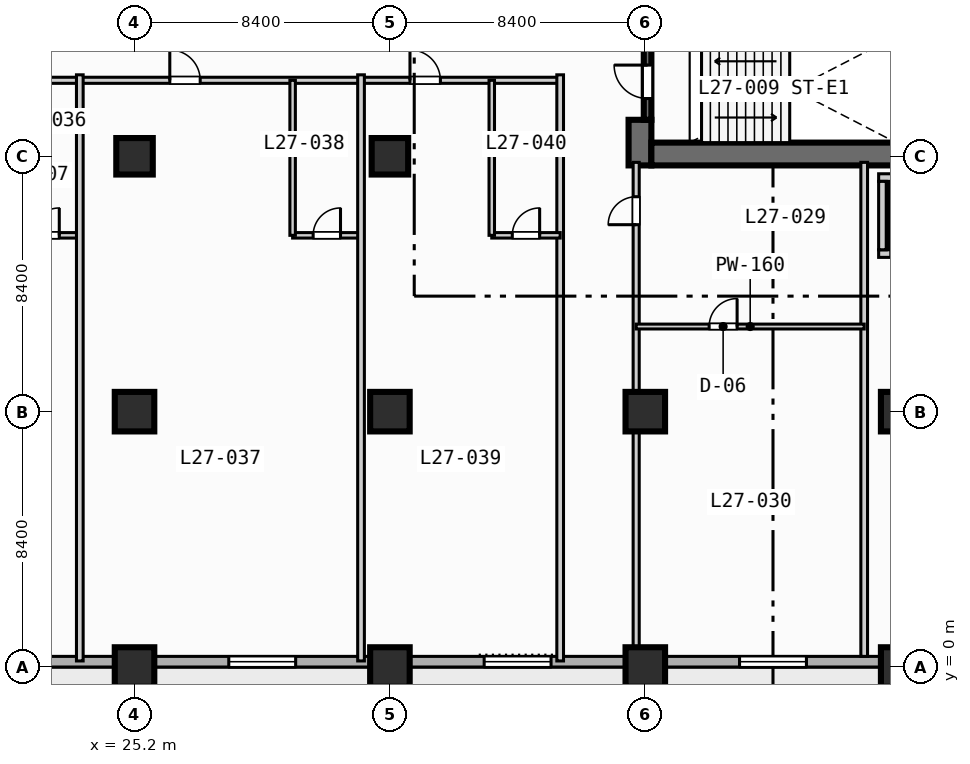
"""IFC4 building model, lengths in metres.
Left out: names, types, materials, properties, quantities, classifications, styles, units other than length and angle.
Written with IfcOpenShell. Run it as: python <this file> out.ifc"""

import sys

from ifc_helpers import new_model, si_unit, direction, frame, frame_2d, origin, origin_2d, place, context, subcontext, project, spatial, rectangle, extrude, element, fill, save


model = new_model("IFC4")
c1 = context("Model", 3, precision=1e-05, world=origin(), true_north=direction((0.0, 1.0)))
c2 = subcontext(c1, "Body", "Model", "MODEL_VIEW")
j1 = project(units=[si_unit("LENGTHUNIT", "METRE"), si_unit("PLANEANGLEUNIT", "RADIAN")], contexts=[c1])
p1 = place(None, origin())
s1 = spatial("IfcSite", under=j1, at=p1, CompositionType="ELEMENT")
p2 = place(p1, origin())
s2 = spatial("IfcBuilding", under=s1, at=p2, CompositionType="ELEMENT")
p3 = place(p2, frame((0.0, 0.0, 115.2)))
s3 = spatial("IfcBuildingStorey", under=s2, at=p3, CompositionType="ELEMENT", Elevation=115.2)
p4 = place(p3, frame((41.825, 16.5, 0.0), z_axis=(0.0, 0.0, 1.0), x_axis=(0.0, 1.0, 0.0)))
e1 = element("IfcWall", 1, at=p4, inside=s3, PredefinedType="SHEAR", context=c2, shape_type="SweptSolid", body=[
    extrude(rectangle(XDim=1.5, YDim=0.75, at=frame_2d((0.75, 0.0))), origin(), (0.0, 0.0, 1.0), 3.55),
])
p5 = place(p3, frame((42.2, 16.875, 0.0), z_axis=(0.0, 0.0, 1.0), x_axis=(1.0, 0.0, 0.0)))
e2 = element("IfcWall", 2, at=p5, inside=s3, PredefinedType="SHEAR", context=c2, shape_type="SweptSolid", body=[
    extrude(rectangle(XDim=16.35, YDim=0.75, at=frame_2d((8.175, 0.0))), origin(), (0.0, 0.0, 1.0), 3.55),
])
for number, where, z_axis, x_axis in (
    (3, (25.2, 0.0, 0.0), (0.0, 0.0, 1.0), (1.0, 0.0, 0.0)),
    (4, (25.2, 8.4, 0.0), (0.0, 0.0, 1.0), (1.0, 0.0, 0.0)),
):
    element("IfcColumn", number, at=place(p3, frame(where, z_axis=z_axis, x_axis=x_axis)), inside=s3, PredefinedType="COLUMN", context=c2, shape_type="SweptSolid", body=[
        extrude(rectangle(XDim=1.3, YDim=1.3, at=origin_2d()), origin(), (0.0, 0.0, 1.0), 3.8),
    ])
p6 = place(p3, frame((25.2, 16.8, 0.0), z_axis=(0.0, 0.0, 1.0), x_axis=(1.0, 0.0, 0.0)))
e5 = element("IfcColumn", 5, at=p6, inside=s3, PredefinedType="COLUMN", context=c2, shape_type="SweptSolid", body=[
    extrude(rectangle(XDim=1.2, YDim=1.2, at=origin_2d()), origin(), (0.0, 0.0, 1.0), 3.8),
])
for number, where, z_axis, x_axis in (
    (6, (33.6, 0.0, 0.0), (0.0, 0.0, 1.0), (1.0, 0.0, 0.0)),
    (7, (33.6, 8.4, 0.0), (0.0, 0.0, 1.0), (1.0, 0.0, 0.0)),
):
    element("IfcColumn", number, at=place(p3, frame(where, z_axis=z_axis, x_axis=x_axis)), inside=s3, PredefinedType="COLUMN", context=c2, shape_type="SweptSolid", body=[
        extrude(rectangle(XDim=1.3, YDim=1.3, at=origin_2d()), origin(), (0.0, 0.0, 1.0), 3.8),
    ])
p7 = place(p3, frame((33.6, 16.8, 0.0), z_axis=(0.0, 0.0, 1.0), x_axis=(1.0, 0.0, 0.0)))
e8 = element("IfcColumn", 8, at=p7, inside=s3, PredefinedType="COLUMN", context=c2, shape_type="SweptSolid", body=[
    extrude(rectangle(XDim=1.2, YDim=1.2, at=origin_2d()), origin(), (0.0, 0.0, 1.0), 3.8),
])
for number, where, z_axis, x_axis in (
    (9, (42.0, 0.0, 0.0), (0.0, 0.0, 1.0), (1.0, 0.0, 0.0)),
    (10, (42.0, 8.4, 0.0), (0.0, 0.0, 1.0), (1.0, 0.0, 0.0)),
    (11, (50.4, 0.0, 0.0), (0.0, 0.0, 1.0), (1.0, 0.0, 0.0)),
    (12, (50.4, 8.4, 0.0), (0.0, 0.0, 1.0), (1.0, 0.0, 0.0)),
):
    element("IfcColumn", number, at=place(p3, frame(where, z_axis=z_axis, x_axis=x_axis)), inside=s3, PredefinedType="COLUMN", context=c2, shape_type="SweptSolid", body=[
        extrude(rectangle(XDim=1.3, YDim=1.3, at=origin_2d()), origin(), (0.0, 0.0, 1.0), 3.8),
    ])
p8 = place(p3, frame((72.425, 0.175, 0.0), z_axis=(0.0, 0.0, 1.0), x_axis=(-1.0, 0.0, 0.0)))
e13 = element("IfcWall", 13, at=p8, inside=s3, PredefinedType="STANDARD", context=c2, shape_type="SweptSolid", body=[
    extrude(rectangle(XDim=69.25, YDim=0.35, at=frame_2d((34.625, 0.0))), origin(), (0.0, 0.0, 1.0), 3.55),
])
p9 = place(p8, frame((50.725, 0.0, 0.0)))
e14 = element("IfcOpeningElement", 14, at=p9, cuts=e13, PredefinedType="OPENING", context=c2, shape_type="SweptSolid", body=[
    extrude(rectangle(XDim=1.4, YDim=2.2, at=frame_2d((0.7, 1.1))), frame((0.0, 0.185, 0.0), z_axis=(0.0, -1.0, 0.0), x_axis=(1.0, 0.0, 0.0)), (0.0, 0.0, 1.0), 0.37),
])
p10 = place(p8, frame((58.725, 0.0, 0.85)))
e15 = element("IfcOpeningElement", 15, at=p10, cuts=e13, PredefinedType="OPENING", context=c2, shape_type="SweptSolid", body=[
    extrude(rectangle(XDim=2.2, YDim=1.8, at=frame_2d((1.1, 0.9))), frame((0.0, 0.185, 0.0), z_axis=(0.0, -1.0, 0.0), x_axis=(1.0, 0.0, 0.0)), (0.0, 0.0, 1.0), 0.37),
])
p11 = place(p8, frame((41.925, 0.0, 0.85)))
e16 = element("IfcOpeningElement", 16, at=p11, cuts=e13, PredefinedType="OPENING", context=c2, shape_type="SweptSolid", body=[
    extrude(rectangle(XDim=2.2, YDim=1.8, at=frame_2d((1.1, 0.9))), frame((0.0, 0.185, 0.0), z_axis=(0.0, -1.0, 0.0), x_axis=(1.0, 0.0, 0.0)), (0.0, 0.0, 1.0), 0.37),
])
p12 = place(p8, frame((33.525, 0.0, 0.85)))
e17 = element("IfcOpeningElement", 17, at=p12, cuts=e13, PredefinedType="OPENING", context=c2, shape_type="SweptSolid", body=[
    extrude(rectangle(XDim=2.2, YDim=1.8, at=frame_2d((1.1, 0.9))), frame((0.0, 0.185, 0.0), z_axis=(0.0, -1.0, 0.0), x_axis=(1.0, 0.0, 0.0)), (0.0, 0.0, 1.0), 0.37),
])
p13 = place(p8, frame((25.125, 0.0, 0.85)))
e18 = element("IfcOpeningElement", 18, at=p13, cuts=e13, PredefinedType="OPENING", context=c2, shape_type="SweptSolid", body=[
    extrude(rectangle(XDim=2.2, YDim=1.8, at=frame_2d((1.1, 0.9))), frame((0.0, 0.185, 0.0), z_axis=(0.0, -1.0, 0.0), x_axis=(1.0, 0.0, 0.0)), (0.0, 0.0, 1.0), 0.37),
])
p14 = place(p8, frame((8.325, 0.0, 0.85)))
e19 = element("IfcOpeningElement", 19, at=p14, cuts=e13, PredefinedType="OPENING", context=c2, shape_type="SweptSolid", body=[
    extrude(rectangle(XDim=2.2, YDim=1.8, at=frame_2d((1.1, 0.9))), frame((0.0, 0.185, 0.0), z_axis=(0.0, -1.0, 0.0), x_axis=(1.0, 0.0, 0.0)), (0.0, 0.0, 1.0), 0.37),
])
p15 = place(p8, frame((2.125, 0.0, 0.85)))
e20 = element("IfcOpeningElement", 20, at=p15, cuts=e13, PredefinedType="OPENING", context=c2, shape_type="SweptSolid", body=[
    extrude(rectangle(XDim=1.8, YDim=1.8, at=frame_2d((0.9, 0.9))), frame((0.0, 0.185, 0.0), z_axis=(0.0, -1.0, 0.0), x_axis=(1.0, 0.0, 0.0)), (0.0, 0.0, 1.0), 0.37),
])
p16 = place(p3, frame((42.075, 18.0, 0.0), z_axis=(0.0, 0.0, 1.0), x_axis=(0.0, 1.0, 0.0)))
e21 = element("IfcWall", 21, at=p16, inside=s3, PredefinedType="SOLIDWALL", context=c2, shape_type="SweptSolid", body=[
    extrude(rectangle(XDim=2.5, YDim=0.25, at=frame_2d((1.25, 0.0))), origin(), (0.0, 0.0, 1.0), 3.55),
])
p17 = place(p16, frame((0.7, 0.0, 0.0)))
e22 = element("IfcOpeningElement", 22, at=p17, cuts=e21, PredefinedType="OPENING", context=c2, shape_type="SweptSolid", body=[
    extrude(rectangle(XDim=1.1, YDim=2.15, at=frame_2d((0.55, 1.075))), frame((0.0, 0.135, 0.0), z_axis=(0.0, -1.0, 0.0), x_axis=(1.0, 0.0, 0.0)), (0.0, 0.0, 1.0), 0.27),
])
p18 = place(p3, frame((49.675, 13.6, 0.0), z_axis=(0.0, 0.0, 1.0), x_axis=(1.0, 0.0, 0.0)))
e23 = element("IfcWall", 23, at=p18, inside=s3, PredefinedType="SOLIDWALL", context=c2, shape_type="SweptSolid", body=[
    extrude(rectangle(XDim=2.25, YDim=0.25, at=frame_2d((1.125, 0.0))), origin(), (0.0, 0.0, 1.0), 3.55),
])
p19 = place(p18, frame((0.4, 0.0, 0.0)))
e24 = element("IfcOpeningElement", 24, at=p19, cuts=e23, PredefinedType="OPENING", context=c2, shape_type="SweptSolid", body=[
    extrude(rectangle(XDim=1.1, YDim=2.15, at=frame_2d((0.55, 1.075))), frame((0.0, 0.135, 0.0), z_axis=(0.0, -1.0, 0.0), x_axis=(1.0, 0.0, 0.0)), (0.0, 0.0, 1.0), 0.27),
])
for number, where, z_axis, x_axis in (
    (25, (49.675, 16.1, 0.0), (0.0, 0.0, 1.0), (1.0, 0.0, 0.0)),
    (26, (49.8, 13.725, 0.0), (0.0, 0.0, 1.0), (0.0, 1.0, 0.0)),
):
    element("IfcWall", number, at=place(p3, frame(where, z_axis=z_axis, x_axis=x_axis)), inside=s3, PredefinedType="SOLIDWALL", context=c2, shape_type="SweptSolid", body=[
        extrude(rectangle(XDim=2.25, YDim=0.25, at=frame_2d((1.125, 0.0))), origin(), (0.0, 0.0, 1.0), 3.55),
    ])
p20 = place(p3, frame((41.7, 0.35, 0.0), z_axis=(0.0, 0.0, 1.0), x_axis=(0.0, 1.0, 0.0)))
e27 = element("IfcWall", 27, at=p20, inside=s3, PredefinedType="PARTITIONING", context=c2, shape_type="SweptSolid", body=[
    extrude(rectangle(XDim=16.25, YDim=0.2, at=frame_2d((8.125, 0.0))), origin(), (0.0, 0.0, 1.0), 2.8),
])
p21 = place(p20, frame((14.2, 0.0, 0.0)))
e28 = element("IfcOpeningElement", 28, at=p21, cuts=e27, PredefinedType="OPENING", context=c2, shape_type="SweptSolid", body=[
    extrude(rectangle(XDim=0.92, YDim=2.1, at=frame_2d((0.46, 1.05))), frame((0.0, 0.11, 0.0), z_axis=(0.0, -1.0, 0.0), x_axis=(1.0, 0.0, 0.0)), (0.0, 0.0, 1.0), 0.22),
])
p22 = place(p3, frame((49.2, 0.35, 0.0), z_axis=(0.0, 0.0, 1.0), x_axis=(0.0, 1.0, 0.0)))
e29 = element("IfcWall", 29, at=p22, inside=s3, PredefinedType="PARTITIONING", context=c2, shape_type="SweptSolid", body=[
    extrude(rectangle(XDim=16.25, YDim=0.22, at=frame_2d((8.125, 0.0))), origin(), (0.0, 0.0, 1.0), 3.55),
])
p23 = place(p3, frame((41.7, 11.2, 0.0), z_axis=(0.0, 0.0, 1.0), x_axis=(1.0, 0.0, 0.0)))
e30 = element("IfcWall", 30, at=p23, inside=s3, PredefinedType="PARTITIONING", context=c2, shape_type="SweptSolid", body=[
    extrude(rectangle(XDim=7.5, YDim=0.16, at=frame_2d((3.75, 0.0))), origin(), (0.0, 0.0, 1.0), 3.55),
])
p24 = place(p23, frame((2.4, 0.0, 0.0)))
e31 = element("IfcOpeningElement", 31, at=p24, cuts=e30, PredefinedType="OPENING", context=c2, shape_type="SweptSolid", body=[
    extrude(rectangle(XDim=0.92, YDim=2.1, at=frame_2d((0.46, 1.05))), frame((0.0, 0.09, 0.0), z_axis=(0.0, -1.0, 0.0), x_axis=(1.0, 0.0, 0.0)), (0.0, 0.0, 1.0), 0.18),
])
p25 = place(p3, frame((3.4, 19.3, 0.0), z_axis=(0.0, 0.0, 1.0), x_axis=(1.0, 0.0, 0.0)))
e32 = element("IfcWall", 32, at=p25, inside=s3, PredefinedType="PARTITIONING", context=c2, shape_type="SweptSolid", body=[
    extrude(rectangle(XDim=35.8, YDim=0.2, at=frame_2d((17.9, 0.0))), origin(), (0.0, 0.0, 1.0), 3.55),
])
p26 = place(p25, frame((6.065, 0.0, 0.0)))
e33 = element("IfcOpeningElement", 33, at=p26, cuts=e32, PredefinedType="OPENING", context=c2, shape_type="SweptSolid", body=[
    extrude(rectangle(XDim=1.0, YDim=2.15, at=frame_2d((0.5, 1.075))), frame((0.0, 0.11, 0.0), z_axis=(0.0, -1.0, 0.0), x_axis=(1.0, 0.0, 0.0)), (0.0, 0.0, 1.0), 0.22),
])
p27 = place(p25, frame((13.735, 0.0, 0.0)))
e34 = element("IfcOpeningElement", 34, at=p27, cuts=e32, PredefinedType="OPENING", context=c2, shape_type="SweptSolid", body=[
    extrude(rectangle(XDim=1.0, YDim=2.15, at=frame_2d((0.5, 1.075))), frame((0.0, 0.11, 0.0), z_axis=(0.0, -1.0, 0.0), x_axis=(1.0, 0.0, 0.0)), (0.0, 0.0, 1.0), 0.22),
])
p28 = place(p25, frame((22.96, 0.0, 0.0)))
e35 = element("IfcOpeningElement", 35, at=p28, cuts=e32, PredefinedType="OPENING", context=c2, shape_type="SweptSolid", body=[
    extrude(rectangle(XDim=1.0, YDim=2.15, at=frame_2d((0.5, 1.075))), frame((0.0, 0.11, 0.0), z_axis=(0.0, -1.0, 0.0), x_axis=(1.0, 0.0, 0.0)), (0.0, 0.0, 1.0), 0.22),
])
p29 = place(p25, frame((30.86, 0.0, 0.0)))
e36 = element("IfcOpeningElement", 36, at=p29, cuts=e32, PredefinedType="OPENING", context=c2, shape_type="SweptSolid", body=[
    extrude(rectangle(XDim=1.0, YDim=2.15, at=frame_2d((0.5, 1.075))), frame((0.0, 0.11, 0.0), z_axis=(0.0, -1.0, 0.0), x_axis=(1.0, 0.0, 0.0)), (0.0, 0.0, 1.0), 0.22),
])
p30 = place(p3, frame((21.15, 14.2, 0.0), z_axis=(0.0, 0.0, 1.0), x_axis=(1.0, 0.0, 0.0)))
e37 = element("IfcWall", 37, at=p30, inside=s3, PredefinedType="PLUMBINGWALL", context=c2, shape_type="SweptSolid", body=[
    extrude(rectangle(XDim=2.25, YDim=0.18, at=frame_2d((1.125, 0.0))), origin(), (0.0, 0.0, 1.0), 3.55),
])
p31 = place(p30, frame((0.675, 0.0, 0.0)))
e38 = element("IfcOpeningElement", 38, at=p31, cuts=e37, PredefinedType="OPENING", context=c2, shape_type="SweptSolid", body=[
    extrude(rectangle(XDim=0.9, YDim=2.1, at=frame_2d((0.45, 1.05))), frame((0.0, 0.1, 0.0), z_axis=(0.0, -1.0, 0.0), x_axis=(1.0, 0.0, 0.0)), (0.0, 0.0, 1.0), 0.2),
])
p32 = place(p3, frame((23.4, 0.2, 0.0), z_axis=(0.0, 0.0, 1.0), x_axis=(0.0, 1.0, 0.0)))
e39 = element("IfcWall", 39, at=p32, inside=s3, PredefinedType="PARTITIONING", context=c2, shape_type="SweptSolid", body=[
    extrude(rectangle(XDim=19.28, YDim=0.22, at=frame_2d((9.64, 0.0))), origin(), (0.0, 0.0, 1.0), 3.55),
])
p33 = place(p3, frame((30.4, 14.2, 0.0), z_axis=(0.0, 0.0, 1.0), x_axis=(1.0, 0.0, 0.0)))
e40 = element("IfcWall", 40, at=p33, inside=s3, PredefinedType="PLUMBINGWALL", context=c2, shape_type="SweptSolid", body=[
    extrude(rectangle(XDim=2.25, YDim=0.18, at=frame_2d((1.125, 0.0))), origin(), (0.0, 0.0, 1.0), 3.55),
])
p34 = place(p33, frame((0.675, 0.0, 0.0)))
e41 = element("IfcOpeningElement", 41, at=p34, cuts=e40, PredefinedType="OPENING", context=c2, shape_type="SweptSolid", body=[
    extrude(rectangle(XDim=0.9, YDim=2.1, at=frame_2d((0.45, 1.05))), frame((0.0, 0.1, 0.0), z_axis=(0.0, -1.0, 0.0), x_axis=(1.0, 0.0, 0.0)), (0.0, 0.0, 1.0), 0.2),
])
p35 = place(p3, frame((30.4, 14.2, 0.0), z_axis=(0.0, 0.0, 1.0), x_axis=(0.0, 1.0, 0.0)))
e42 = element("IfcWall", 42, at=p35, inside=s3, PredefinedType="PLUMBINGWALL", context=c2, shape_type="SweptSolid", body=[
    extrude(rectangle(XDim=5.1, YDim=0.18, at=frame_2d((2.55, 0.0))), origin(), (0.0, 0.0, 1.0), 3.55),
])
for number, where, z_axis, x_axis in (
    (43, (32.65, 0.2, 0.0), (0.0, 0.0, 1.0), (0.0, 1.0, 0.0)),
    (44, (39.2, 0.2, 0.0), (0.0, 0.0, 1.0), (0.0, 1.0, 0.0)),
):
    element("IfcWall", number, at=place(p3, frame(where, z_axis=z_axis, x_axis=x_axis)), inside=s3, PredefinedType="PARTITIONING", context=c2, shape_type="SweptSolid", body=[
        extrude(rectangle(XDim=19.28, YDim=0.22, at=frame_2d((9.64, 0.0))), origin(), (0.0, 0.0, 1.0), 3.55),
    ])
p36 = place(p3, frame((36.95, 14.2, 0.0), z_axis=(0.0, 0.0, 1.0), x_axis=(1.0, 0.0, 0.0)))
e45 = element("IfcWall", 45, at=p36, inside=s3, PredefinedType="PLUMBINGWALL", context=c2, shape_type="SweptSolid", body=[
    extrude(rectangle(XDim=2.25, YDim=0.18, at=frame_2d((1.125, 0.0))), origin(), (0.0, 0.0, 1.0), 3.55),
])
p37 = place(p36, frame((0.675, 0.0, 0.0)))
e46 = element("IfcOpeningElement", 46, at=p37, cuts=e45, PredefinedType="OPENING", context=c2, shape_type="SweptSolid", body=[
    extrude(rectangle(XDim=0.9, YDim=2.1, at=frame_2d((0.45, 1.05))), frame((0.0, 0.1, 0.0), z_axis=(0.0, -1.0, 0.0), x_axis=(1.0, 0.0, 0.0)), (0.0, 0.0, 1.0), 0.2),
])
p38 = place(p3, frame((36.95, 14.2, 0.0), z_axis=(0.0, 0.0, 1.0), x_axis=(0.0, 1.0, 0.0)))
e47 = element("IfcWall", 47, at=p38, inside=s3, PredefinedType="PLUMBINGWALL", context=c2, shape_type="SweptSolid", body=[
    extrude(rectangle(XDim=5.1, YDim=0.18, at=frame_2d((2.55, 0.0))), origin(), (0.0, 0.0, 1.0), 3.55),
])
p39 = place(p11, origin())
e48 = element("IfcWindow", 48, at=p39, inside=s3, PartitioningType="SINGLE_PANEL", PredefinedType="WINDOW", context=c2, shape_type="SweptSolid", body=[
    extrude(rectangle(XDim=2.2, YDim=1.8, at=frame_2d((1.1, 0.9))), frame((0.0, 0.03, 0.0), z_axis=(0.0, -1.0, 0.0), x_axis=(1.0, 0.0, 0.0)), (0.0, 0.0, 1.0), 0.06),
])
fill(e16, e48)
p40 = place(p12, origin())
e49 = element("IfcWindow", 49, at=p40, inside=s3, PartitioningType="SINGLE_PANEL", PredefinedType="WINDOW", context=c2, shape_type="SweptSolid", body=[
    extrude(rectangle(XDim=2.2, YDim=1.8, at=frame_2d((1.1, 0.9))), frame((0.0, 0.03, 0.0), z_axis=(0.0, -1.0, 0.0), x_axis=(1.0, 0.0, 0.0)), (0.0, 0.0, 1.0), 0.06),
])
fill(e17, e49)
p41 = place(p13, origin())
e50 = element("IfcWindow", 50, at=p41, inside=s3, PartitioningType="SINGLE_PANEL", PredefinedType="WINDOW", context=c2, shape_type="SweptSolid", body=[
    extrude(rectangle(XDim=2.2, YDim=1.8, at=frame_2d((1.1, 0.9))), frame((0.0, 0.03, 0.0), z_axis=(0.0, -1.0, 0.0), x_axis=(1.0, 0.0, 0.0)), (0.0, 0.0, 1.0), 0.06),
])
fill(e18, e50)
p42 = place(p17, origin())
e51 = element("IfcDoor", 51, at=p42, inside=s3, OperationType="SINGLE_SWING_RIGHT", PredefinedType="DOOR", context=c2, shape_type="SweptSolid", body=[
    extrude(rectangle(XDim=1.1, YDim=2.15, at=frame_2d((0.55, 1.075))), frame((0.0, 0.025, 0.0), z_axis=(0.0, -1.0, 0.0), x_axis=(1.0, 0.0, 0.0)), (0.0, 0.0, 1.0), 0.05),
])
fill(e22, e51)
p43 = place(p21, origin())
e52 = element("IfcDoor", 52, at=p43, inside=s3, OperationType="SINGLE_SWING_LEFT", PredefinedType="DOOR", context=c2, shape_type="SweptSolid", body=[
    extrude(rectangle(XDim=0.92, YDim=2.1, at=frame_2d((0.46, 1.05))), frame((0.0, 0.025, 0.0), z_axis=(0.0, -1.0, 0.0), x_axis=(1.0, 0.0, 0.0)), (0.0, 0.0, 1.0), 0.05),
])
fill(e28, e52)
p44 = place(p24, origin())
e53 = element("IfcDoor", 53, at=p44, inside=s3, OperationType="SINGLE_SWING_RIGHT", PredefinedType="DOOR", context=c2, shape_type="SweptSolid", body=[
    extrude(rectangle(XDim=0.92, YDim=2.1, at=frame_2d((0.46, 1.05))), frame((0.0, 0.025, 0.0), z_axis=(0.0, -1.0, 0.0), x_axis=(1.0, 0.0, 0.0)), (0.0, 0.0, 1.0), 0.05),
])
fill(e31, e53)
p45 = place(p28, origin())
e54 = element("IfcDoor", 54, at=p45, inside=s3, OperationType="SINGLE_SWING_LEFT", PredefinedType="DOOR", context=c2, shape_type="SweptSolid", body=[
    extrude(rectangle(XDim=1.0, YDim=2.15, at=frame_2d((0.5, 1.075))), frame((0.0, 0.025, 0.0), z_axis=(0.0, -1.0, 0.0), x_axis=(1.0, 0.0, 0.0)), (0.0, 0.0, 1.0), 0.05),
])
fill(e35, e54)
p46 = place(p29, origin())
e55 = element("IfcDoor", 55, at=p46, inside=s3, OperationType="SINGLE_SWING_LEFT", PredefinedType="DOOR", context=c2, shape_type="SweptSolid", body=[
    extrude(rectangle(XDim=1.0, YDim=2.15, at=frame_2d((0.5, 1.075))), frame((0.0, 0.025, 0.0), z_axis=(0.0, -1.0, 0.0), x_axis=(1.0, 0.0, 0.0)), (0.0, 0.0, 1.0), 0.05),
])
fill(e36, e55)
p47 = place(p31, origin())
e56 = element("IfcDoor", 56, at=p47, inside=s3, OperationType="SINGLE_SWING_RIGHT", PredefinedType="DOOR", context=c2, shape_type="SweptSolid", body=[
    extrude(rectangle(XDim=0.9, YDim=2.1, at=frame_2d((0.45, 1.05))), frame((0.0, 0.025, 0.0), z_axis=(0.0, -1.0, 0.0), x_axis=(1.0, 0.0, 0.0)), (0.0, 0.0, 1.0), 0.05),
])
fill(e38, e56)
p48 = place(p34, origin())
e57 = element("IfcDoor", 57, at=p48, inside=s3, OperationType="SINGLE_SWING_RIGHT", PredefinedType="DOOR", context=c2, shape_type="SweptSolid", body=[
    extrude(rectangle(XDim=0.9, YDim=2.1, at=frame_2d((0.45, 1.05))), frame((0.0, 0.025, 0.0), z_axis=(0.0, -1.0, 0.0), x_axis=(1.0, 0.0, 0.0)), (0.0, 0.0, 1.0), 0.05),
])
fill(e41, e57)
p49 = place(p37, origin())
e58 = element("IfcDoor", 58, at=p49, inside=s3, OperationType="SINGLE_SWING_RIGHT", PredefinedType="DOOR", context=c2, shape_type="SweptSolid", body=[
    extrude(rectangle(XDim=0.9, YDim=2.1, at=frame_2d((0.45, 1.05))), frame((0.0, 0.025, 0.0), z_axis=(0.0, -1.0, 0.0), x_axis=(1.0, 0.0, 0.0)), (0.0, 0.0, 1.0), 0.05),
])
fill(e46, e58)
save(model, sys.argv[1])
